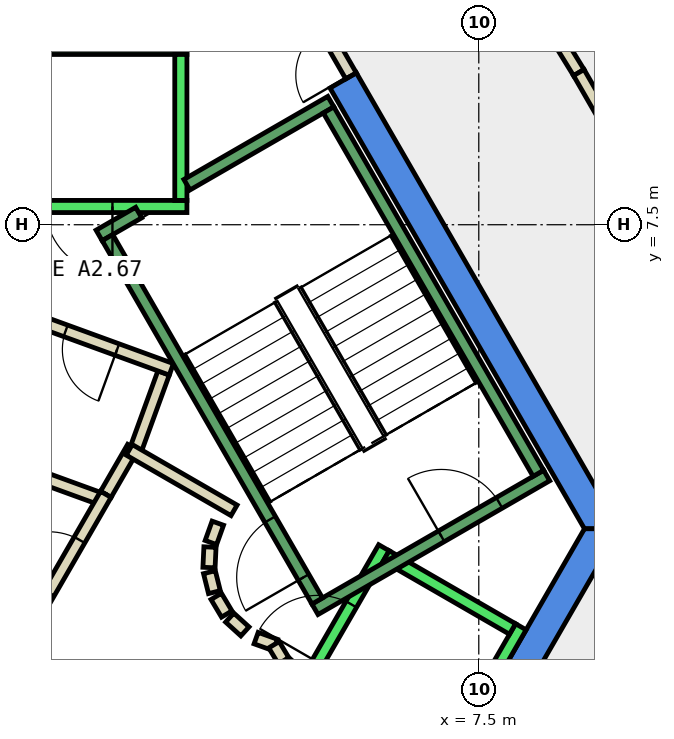
"""IFC4 building model, lengths in metres.
Left out: names, types, materials, properties, quantities, classifications, styles, units other than length and angle.
Written with IfcOpenShell. Run it as: python <this file> out.ifc"""

import sys

from ifc_helpers import new_model, si_unit, direction, frame, frame_2d, origin, place, context, subcontext, project, spatial, polyline, rectangle, outline, extrude, element, fill, save


model = new_model("IFC4")
c1 = context("Model", 3, precision=1e-05, world=origin(), true_north=direction((0.0, 1.0)))
c2 = subcontext(c1, "Body", "Model", "MODEL_VIEW")
j1 = project(units=[si_unit("LENGTHUNIT", "METRE"), si_unit("PLANEANGLEUNIT", "RADIAN")], contexts=[c1])
p1 = place(None, origin())
s1 = spatial("IfcSite", under=j1, at=p1, CompositionType="ELEMENT")
p2 = place(p1, origin())
s2 = spatial("IfcBuilding", under=s1, at=p2, CompositionType="ELEMENT")
p3 = place(p2, frame((0.0, 0.0, 318.8)))
s3 = spatial("IfcBuildingStorey", under=s2, at=p3, CompositionType="ELEMENT", Elevation=318.8)
p4 = place(p3, frame((0.0, 0.0, -0.34)))
e1 = element("IfcWall", 1, at=p4, inside=s3, PredefinedType="SHEAR", context=c2, shape_type="SweptSolid", body=[
    extrude(outline(polyline([(5.486, 9.998), (5.053, 9.748), (9.238, 2.5), (9.815, 2.5), (5.486, 9.998)])), origin(), (0.0, 0.0, 1.0), 3.6),
])
p5 = place(p3, frame((0.0, 0.0, -0.34)))
e2 = element("IfcWall", 2, at=p5, inside=s3, PredefinedType="SHEAR", context=c2, shape_type="SweptSolid", body=[
    extrude(outline(polyline([(4.907, -6.0), (9.815, 2.5), (9.238, 2.5), (4.619, -5.5), (4.907, -6.0)])), origin(), (0.0, 0.0, 1.0), 3.6),
])
p6 = place(p3, frame((1.366, 3.066, 0.0), z_axis=(0.0, 0.0, 1.0), x_axis=(0.499698775601, 0.866199245938, 0.0)))
e3 = element("IfcWall", 3, at=p6, inside=s3, PredefinedType="PARTITIONING", context=c2, shape_type="SweptSolid", body=[
    extrude(rectangle(XDim=0.893, YDim=0.2, at=frame_2d((0.446, 0.0))), origin(), (0.0, 0.0, 1.0), 3.26),
])
p7 = place(p3, frame((1.838, 3.748, 0.0), z_axis=(0.0, 0.0, 1.0), x_axis=(0.341883255813, 0.939742432475, 0.0)))
e4 = element("IfcWall", 4, at=p7, inside=s3, PredefinedType="PARTITIONING", context=c2, shape_type="SweptSolid", body=[
    extrude(rectangle(XDim=1.398, YDim=0.2, at=frame_2d((0.699, 0.0))), origin(), (0.0, 0.0, 1.0), 3.26),
])
p8 = place(p3, frame((2.444, 5.122, 0.0), z_axis=(0.0, 0.0, 1.0), x_axis=(-0.939650782256, 0.342135071873, 0.0)))
e5 = element("IfcWall", 5, at=p8, inside=s3, PredefinedType="PARTITIONING", context=c2, shape_type="SweptSolid", body=[
    extrude(rectangle(XDim=2.8, YDim=0.2, at=frame_2d((1.4, 0.0))), origin(), (0.0, 0.0, 1.0), 3.26),
])
p9 = place(p8, frame((0.95, 0.0, 0.0)))
e6 = element("IfcOpeningElement", 6, at=p9, cuts=e5, PredefinedType="OPENING", context=c2, shape_type="SweptSolid", body=[
    extrude(rectangle(XDim=0.9, YDim=2.1, at=frame_2d((0.45, 1.05))), frame((0.0, 0.11, 0.0), z_axis=(0.0, -1.0, 0.0), x_axis=(1.0, 0.0, 0.0)), (0.0, 0.0, 1.0), 0.22),
])
p10 = place(p3, frame((-0.82, 3.756, 0.0), z_axis=(0.0, 0.0, 1.0), x_axis=(0.939740098492, -0.34188967122, 0.0)))
e7 = element("IfcWall", 7, at=p10, inside=s3, PredefinedType="PARTITIONING", context=c2, shape_type="SweptSolid", body=[
    extrude(rectangle(XDim=2.273, YDim=0.2, at=frame_2d((1.136, 0.0))), origin(), (0.0, 0.0, 1.0), 3.26),
])
p11 = place(p3, frame((4.922, 16.867, 0.0), z_axis=(0.0, 0.0, 1.0), x_axis=(0.523943621984, -0.851752945978, 0.0)))
e8 = element("IfcWall", 8, at=p11, inside=s3, PredefinedType="PARTITIONING", context=c2, shape_type="SweptSolid", body=[
    extrude(rectangle(XDim=8.06, YDim=0.2, at=frame_2d((4.03, 0.0))), origin(), (0.0, 0.0, 1.0), 3.26),
])
p12 = place(p3, frame((9.145, 10.002, 0.0), z_axis=(0.0, 0.0, 1.0), x_axis=(0.499798886082, -0.866141485827, 0.0)))
e9 = element("IfcWall", 9, at=p12, inside=s3, PredefinedType="PARTITIONING", context=c2, shape_type="SweptSolid", body=[
    extrude(rectangle(XDim=1.198, YDim=0.2, at=frame_2d((0.599, 0.0))), origin(), (0.0, 0.0, 1.0), 3.26),
])
p13 = place(p3, frame((0.05, 0.787, 0.0), z_axis=(0.0, 0.0, 1.0), x_axis=(0.500070457302, 0.865984721421, 0.0)))
e10 = element("IfcWall", 10, at=p13, inside=s3, PredefinedType="PARTITIONING", context=c2, shape_type="SweptSolid", body=[
    extrude(rectangle(XDim=2.631, YDim=0.2, at=frame_2d((1.316, 0.0))), origin(), (0.0, 0.0, 1.0), 3.26),
])
p14 = place(p13, frame((0.766, 0.0, 0.0)))
e11 = element("IfcOpeningElement", 11, at=p14, cuts=e10, PredefinedType="OPENING", context=c2, shape_type="SweptSolid", body=[
    extrude(rectangle(XDim=1.0, YDim=2.1, at=frame_2d((0.5, 1.05))), frame((0.0, 0.11, 0.0), z_axis=(0.0, -1.0, 0.0), x_axis=(1.0, 0.0, 0.0)), (0.0, 0.0, 1.0), 0.22),
])
p15 = place(p3, frame((1.751, 3.798, 0.0), z_axis=(0.0, 0.0, 1.0), x_axis=(0.866091650241, -0.499885240213, 0.0)))
e12 = element("IfcWall", 12, at=p15, inside=s3, PredefinedType="PARTITIONING", context=c2, shape_type="SweptSolid", body=[
    extrude(rectangle(XDim=1.991, YDim=0.2, at=frame_2d((0.995, 0.0))), origin(), (0.0, 0.0, 1.0), 3.26),
])
p16 = place(p3, frame((3.208, 2.592, 0.0), z_axis=(0.0, 0.0, 1.0), x_axis=(-0.337388820924, -0.941365382578, 0.0)))
e13 = element("IfcWall", 13, at=p16, inside=s3, PredefinedType="PARTITIONING", context=c2, shape_type="SweptSolid", body=[
    extrude(rectangle(XDim=0.338, YDim=0.2, at=frame_2d((0.169, 0.0))), origin(), (0.0, 0.0, 1.0), 3.26),
])
p17 = place(p3, frame((3.079, 2.199, 0.0), z_axis=(0.0, 0.0, 1.0), x_axis=(-0.047771483479, -0.998858290933, 0.0)))
e14 = element("IfcWall", 14, at=p17, inside=s3, PredefinedType="PARTITIONING", context=c2, shape_type="SweptSolid", body=[
    extrude(rectangle(XDim=0.337, YDim=0.2, at=frame_2d((0.169, 0.0))), origin(), (0.0, 0.0, 1.0), 3.26),
])
p18 = place(p3, frame((3.07, 1.786, 0.0), z_axis=(0.0, 0.0, 1.0), x_axis=(0.242705583207, -0.970099994784, 0.0)))
e15 = element("IfcWall", 15, at=p18, inside=s3, PredefinedType="PARTITIONING", context=c2, shape_type="SweptSolid", body=[
    extrude(rectangle(XDim=0.338, YDim=0.2, at=frame_2d((0.169, 0.0))), origin(), (0.0, 0.0, 1.0), 3.26),
])
for number, where, z_axis, x_axis in (
    (16, (3.182, 1.388, 0.0), (0.0, 0.0, 1.0), (0.512, -0.859, 0.0)),
    (17, (3.404, 1.039, 0.0), (0.0, 0.0, 1.0), (0.74, -0.672, 0.0)),
):
    element("IfcWall", number, at=place(p3, frame(where, z_axis=z_axis, x_axis=x_axis)), inside=s3, PredefinedType="PARTITIONING", context=c2, shape_type="SweptSolid", body=[
        extrude(rectangle(XDim=0.338, YDim=0.2, at=frame_2d((0.169, 0.0))), origin(), (0.0, 0.0, 1.0), 3.26),
    ])
p19 = place(p3, frame((3.838, 0.702, 0.0), z_axis=(0.0, 0.0, 1.0), x_axis=(0.941035081519, -0.338308993895, 0.0)))
e18 = element("IfcWall", 18, at=p19, inside=s3, PredefinedType="PARTITIONING", context=c2, shape_type="SweptSolid", body=[
    extrude(rectangle(XDim=0.337, YDim=0.2, at=frame_2d((0.168, 0.0))), origin(), (0.0, 0.0, 1.0), 3.26),
])
p20 = place(p3, frame((4.132, 0.593, 0.0), z_axis=(0.0, 0.0, 1.0), x_axis=(0.513561617048, -0.858052717201, 0.0)))
e19 = element("IfcWall", 19, at=p20, inside=s3, PredefinedType="PARTITIONING", context=c2, shape_type="SweptSolid", body=[
    extrude(rectangle(XDim=0.308, YDim=0.2, at=frame_2d((0.154, 0.0))), origin(), (0.0, 0.0, 1.0), 3.26),
])
p21 = place(p3, frame((4.301, 0.315, 0.0), z_axis=(0.0, 0.0, 1.0), x_axis=(0.741798017506, -0.670623367639, 0.0)))
e20 = element("IfcWall", 20, at=p21, inside=s3, PredefinedType="PARTITIONING", context=c2, shape_type="SweptSolid", body=[
    extrude(rectangle(XDim=0.309, YDim=0.2, at=frame_2d((0.154, 0.0))), origin(), (0.0, 0.0, 1.0), 3.26),
])
p22 = place(p3, frame((5.399, 9.948, 0.0), z_axis=(0.0, 0.0, 1.0), x_axis=(-0.499882215713, 0.866093395895, 0.0)))
e21 = element("IfcWall", 21, at=p22, inside=s3, PredefinedType="PARTITIONING", context=c2, shape_type="SweptSolid", body=[
    extrude(rectangle(XDim=0.926, YDim=0.2, at=frame_2d((0.463, 0.0))), origin(), (0.0, 0.0, 1.0), 2.4),
])
p23 = place(p22, frame((0.017, 0.0, 0.0)))
e22 = element("IfcOpeningElement", 22, at=p23, cuts=e21, PredefinedType="OPENING", context=c2, shape_type="SweptSolid", body=[
    extrude(rectangle(XDim=0.9, YDim=2.1, at=frame_2d((0.45, 1.05))), frame((0.0, 0.11, 0.0), z_axis=(0.0, -1.0, 0.0), x_axis=(1.0, 0.0, 0.0)), (0.0, 0.0, 1.0), 0.22),
])
p24 = place(p3, frame((2.7, 7.8, 0.0), z_axis=(0.0, 0.0, 1.0), x_axis=(-1.0, 0.0, 0.0)))
e23 = element("IfcWall", 23, at=p24, inside=s3, PredefinedType="STANDARD", context=c2, shape_type="SweptSolid", body=[
    extrude(rectangle(XDim=5.4, YDim=0.2, at=frame_2d((2.7, 0.0))), origin(), (0.0, 0.0, 1.0), 3.26),
])
p25 = place(p24, frame((1.225, 0.0, 0.0)))
e24 = element("IfcOpeningElement", 24, at=p25, cuts=e23, PredefinedType="OPENING", context=c2, shape_type="SweptSolid", body=[
    extrude(rectangle(XDim=1.1, YDim=2.1, at=frame_2d((0.55, 1.05))), frame((0.0, 0.11, 0.0), z_axis=(0.0, -1.0, 0.0), x_axis=(1.0, 0.0, 0.0)), (0.0, 0.0, 1.0), 0.22),
])
p26 = place(p24, frame((3.075, 0.0, 0.0)))
e25 = element("IfcOpeningElement", 25, at=p26, cuts=e23, PredefinedType="OPENING", context=c2, shape_type="SweptSolid", body=[
    extrude(rectangle(XDim=1.1, YDim=2.1, at=frame_2d((0.55, 1.05))), frame((0.0, 0.11, 0.0), z_axis=(0.0, -1.0, 0.0), x_axis=(1.0, 0.0, 0.0)), (0.0, 0.0, 1.0), 0.22),
])
p27 = place(p3, frame((2.7, 10.4, 0.0), z_axis=(0.0, 0.0, 1.0), x_axis=(-1.0, 0.0, 0.0)))
e26 = element("IfcWall", 26, at=p27, inside=s3, PredefinedType="STANDARD", context=c2, shape_type="SweptSolid", body=[
    extrude(rectangle(XDim=5.4, YDim=0.2, at=frame_2d((2.7, 0.0))), origin(), (0.0, 0.0, 1.0), 3.26),
])
p28 = place(p3, frame((2.6, 7.9, 0.0), z_axis=(0.0, 0.0, 1.0), x_axis=(0.0, 1.0, 0.0)))
e27 = element("IfcWall", 27, at=p28, inside=s3, PredefinedType="STANDARD", context=c2, shape_type="SweptSolid", body=[
    extrude(rectangle(XDim=2.4, YDim=0.2, at=frame_2d((1.2, 0.0))), origin(), (0.0, 0.0, 1.0), 3.26),
])
p29 = place(p3, frame((3.24, -2.488, 0.0), z_axis=(0.0, 0.0, 1.0), x_axis=(0.500034260056, 0.866005622828, 0.0)))
e28 = element("IfcWall", 28, at=p29, inside=s3, PredefinedType="STANDARD", context=c2, shape_type="SweptSolid", body=[
    extrude(rectangle(XDim=5.399, YDim=0.2, at=frame_2d((2.7, 0.0))), origin(), (0.0, 0.0, 1.0), 3.26),
])
p30 = place(p29, frame((3.225, 0.0, 0.0)))
e29 = element("IfcOpeningElement", 29, at=p30, cuts=e28, PredefinedType="OPENING", context=c2, shape_type="SweptSolid", body=[
    extrude(rectangle(XDim=1.1, YDim=2.1, at=frame_2d((0.55, 1.05))), frame((0.0, 0.11, 0.0), z_axis=(0.0, -1.0, 0.0), x_axis=(1.0, 0.0, 0.0)), (0.0, 0.0, 1.0), 0.22),
])
p31 = place(p29, frame((1.225, 0.0, 0.0)))
e30 = element("IfcOpeningElement", 30, at=p31, cuts=e28, PredefinedType="OPENING", context=c2, shape_type="SweptSolid", body=[
    extrude(rectangle(XDim=1.1, YDim=2.1, at=frame_2d((0.55, 1.05))), frame((0.0, 0.11, 0.0), z_axis=(0.0, -1.0, 0.0), x_axis=(1.0, 0.0, 0.0)), (0.0, 0.0, 1.0), 0.22),
])
p32 = place(p3, frame((5.492, -3.788, 0.0), z_axis=(0.0, 0.0, 1.0), x_axis=(0.500034260056, 0.866005622828, 0.0)))
e31 = element("IfcWall", 31, at=p32, inside=s3, PredefinedType="STANDARD", context=c2, shape_type="SweptSolid", body=[
    extrude(rectangle(XDim=5.399, YDim=0.2, at=frame_2d((2.7, 0.0))), origin(), (0.0, 0.0, 1.0), 3.26),
])
p33 = place(p3, frame((5.977, 2.052, 0.0), z_axis=(0.0, 0.0, 1.0), x_axis=(0.865973769406, -0.500089422704, 0.0)))
e32 = element("IfcWall", 32, at=p33, inside=s3, PredefinedType="STANDARD", context=c2, shape_type="SweptSolid", body=[
    extrude(rectangle(XDim=2.399, YDim=0.2, at=frame_2d((1.2, 0.0))), origin(), (0.0, 0.0, 1.0), 3.26),
])
p34 = place(p3, frame((4.806, 1.176, 0.0), z_axis=(0.0, 0.0, 1.0), x_axis=(0.866059941101, 0.499940174841, 0.0)))
e33 = element("IfcWall", 33, at=p34, inside=s3, PredefinedType="STANDARD", context=c2, shape_type="SweptSolid", body=[
    extrude(rectangle(XDim=4.4, YDim=0.2, at=frame_2d((2.2, 0.0))), origin(), (0.0, 0.0, 1.0), 3.26),
])
p35 = place(p34, frame((2.4, 0.0, 0.0)))
e34 = element("IfcOpeningElement", 34, at=p35, cuts=e33, PredefinedType="OPENING", context=c2, shape_type="SweptSolid", body=[
    extrude(rectangle(XDim=1.1, YDim=2.2, at=frame_2d((0.55, 1.1))), frame((0.0, 0.11, 0.0), z_axis=(0.0, -1.0, 0.0), x_axis=(1.0, 0.0, 0.0)), (0.0, 0.0, 1.0), 0.22),
])
p36 = place(p3, frame((2.7, 8.158, 0.0), z_axis=(0.0, 0.0, 1.0), x_axis=(0.86611865017, 0.499838457731, 0.0)))
e35 = element("IfcWall", 35, at=p36, inside=s3, PredefinedType="STANDARD", context=c2, shape_type="SweptSolid", body=[
    extrude(rectangle(XDim=2.733, YDim=0.2, at=frame_2d((1.366, 0.0))), origin(), (0.0, 0.0, 1.0), 3.26),
])
p37 = place(p3, frame((1.256, 7.324, 0.0), z_axis=(0.0, 0.0, 1.0), x_axis=(0.865915093549, 0.500191014278, 0.0)))
e36 = element("IfcWall", 36, at=p37, inside=s3, PredefinedType="STANDARD", context=c2, shape_type="SweptSolid", body=[
    extrude(rectangle(XDim=0.752, YDim=0.2, at=frame_2d((0.376, 0.0))), origin(), (0.0, 0.0, 1.0), 3.26),
])
p38 = place(p3, frame((4.843, 1.312, 0.0), z_axis=(0.0, 0.0, 1.0), x_axis=(-0.499963383562, 0.866046543262, 0.0)))
e37 = element("IfcWall", 37, at=p38, inside=s3, PredefinedType="STANDARD", context=c2, shape_type="SweptSolid", body=[
    extrude(rectangle(XDim=6.9, YDim=0.2, at=frame_2d((3.45, 0.0))), origin(), (0.0, 0.0, 1.0), 3.26),
])
p39 = place(p38, frame((0.45, 0.0, 0.0)))
e38 = element("IfcOpeningElement", 38, at=p39, cuts=e37, PredefinedType="OPENING", context=c2, shape_type="SweptSolid", body=[
    extrude(rectangle(XDim=1.1, YDim=2.2, at=frame_2d((0.55, 1.1))), frame((0.0, 0.11, 0.0), z_axis=(0.0, -1.0, 0.0), x_axis=(1.0, 0.0, 0.0)), (0.0, 0.0, 1.0), 0.22),
])
p40 = place(p3, frame((8.48, 3.412, 0.0), z_axis=(0.0, 0.0, 1.0), x_axis=(-0.499978703459, 0.866037698999, 0.0)))
e39 = element("IfcWall", 39, at=p40, inside=s3, PredefinedType="STANDARD", context=c2, shape_type="SweptSolid", body=[
    extrude(rectangle(XDim=6.9, YDim=0.2, at=frame_2d((3.45, 0.0))), origin(), (0.0, 0.0, 1.0), 3.26),
])
p41 = place(p14, origin())
e40 = element("IfcDoor", 40, at=p41, inside=s3, OperationType="SINGLE_SWING_RIGHT", PredefinedType="DOOR", context=c2, shape_type="SweptSolid", body=[
    extrude(rectangle(XDim=1.0, YDim=2.1, at=frame_2d((0.5, 1.05))), frame((0.0, 0.025, 0.0), z_axis=(0.0, -1.0, 0.0), x_axis=(1.0, 0.0, 0.0)), (0.0, 0.0, 1.0), 0.05),
])
fill(e11, e40)
p42 = place(p9, origin())
e41 = element("IfcDoor", 41, at=p42, inside=s3, OperationType="SINGLE_SWING_LEFT", PredefinedType="DOOR", context=c2, shape_type="SweptSolid", body=[
    extrude(rectangle(XDim=0.9, YDim=2.1, at=frame_2d((0.45, 1.05))), frame((0.0, 0.025, 0.0), z_axis=(0.0, -1.0, 0.0), x_axis=(1.0, 0.0, 0.0)), (0.0, 0.0, 1.0), 0.05),
])
fill(e6, e41)
p43 = place(p23, origin())
e42 = element("IfcDoor", 42, at=p43, inside=s3, OperationType="SINGLE_SWING_LEFT", PredefinedType="DOOR", context=c2, shape_type="SweptSolid", body=[
    extrude(rectangle(XDim=0.9, YDim=2.1, at=frame_2d((0.45, 1.05))), frame((0.0, 0.025, 0.0), z_axis=(0.0, -1.0, 0.0), x_axis=(1.0, 0.0, 0.0)), (0.0, 0.0, 1.0), 0.05),
])
fill(e22, e42)
p44 = place(p25, origin())
e43 = element("IfcDoor", 43, at=p44, inside=s3, OperationType="SLIDING_TO_LEFT", PredefinedType="DOOR", context=c2, shape_type="SweptSolid", body=[
    extrude(rectangle(XDim=1.1, YDim=2.1, at=frame_2d((0.55, 1.05))), frame((0.0, 0.025, 0.0), z_axis=(0.0, -1.0, 0.0), x_axis=(1.0, 0.0, 0.0)), (0.0, 0.0, 1.0), 0.05),
])
fill(e24, e43)
p45 = place(p30, origin())
e44 = element("IfcDoor", 44, at=p45, inside=s3, OperationType="SLIDING_TO_LEFT", PredefinedType="DOOR", context=c2, shape_type="SweptSolid", body=[
    extrude(rectangle(XDim=1.1, YDim=2.1, at=frame_2d((0.55, 1.05))), frame((0.0, 0.025, 0.0), z_axis=(0.0, -1.0, 0.0), x_axis=(1.0, 0.0, 0.0)), (0.0, 0.0, 1.0), 0.05),
])
fill(e29, e44)
p46 = place(p39, origin())
e45 = element("IfcDoor", 45, at=p46, inside=s3, OperationType="SINGLE_SWING_LEFT", PredefinedType="DOOR", context=c2, shape_type="SweptSolid", body=[
    extrude(rectangle(XDim=1.1, YDim=2.2, at=frame_2d((0.55, 1.1))), frame((0.0, 0.025, 0.0), z_axis=(0.0, -1.0, 0.0), x_axis=(1.0, 0.0, 0.0)), (0.0, 0.0, 1.0), 0.05),
])
fill(e38, e45)
p47 = place(p35, origin())
e46 = element("IfcDoor", 46, at=p47, inside=s3, OperationType="SINGLE_SWING_LEFT", PredefinedType="DOOR", context=c2, shape_type="SweptSolid", body=[
    extrude(rectangle(XDim=1.1, YDim=2.2, at=frame_2d((0.55, 1.1))), frame((0.0, 0.025, 0.0), z_axis=(0.0, -1.0, 0.0), x_axis=(1.0, 0.0, 0.0)), (0.0, 0.0, 1.0), 0.05),
])
fill(e34, e46)
save(model, sys.argv[1])
